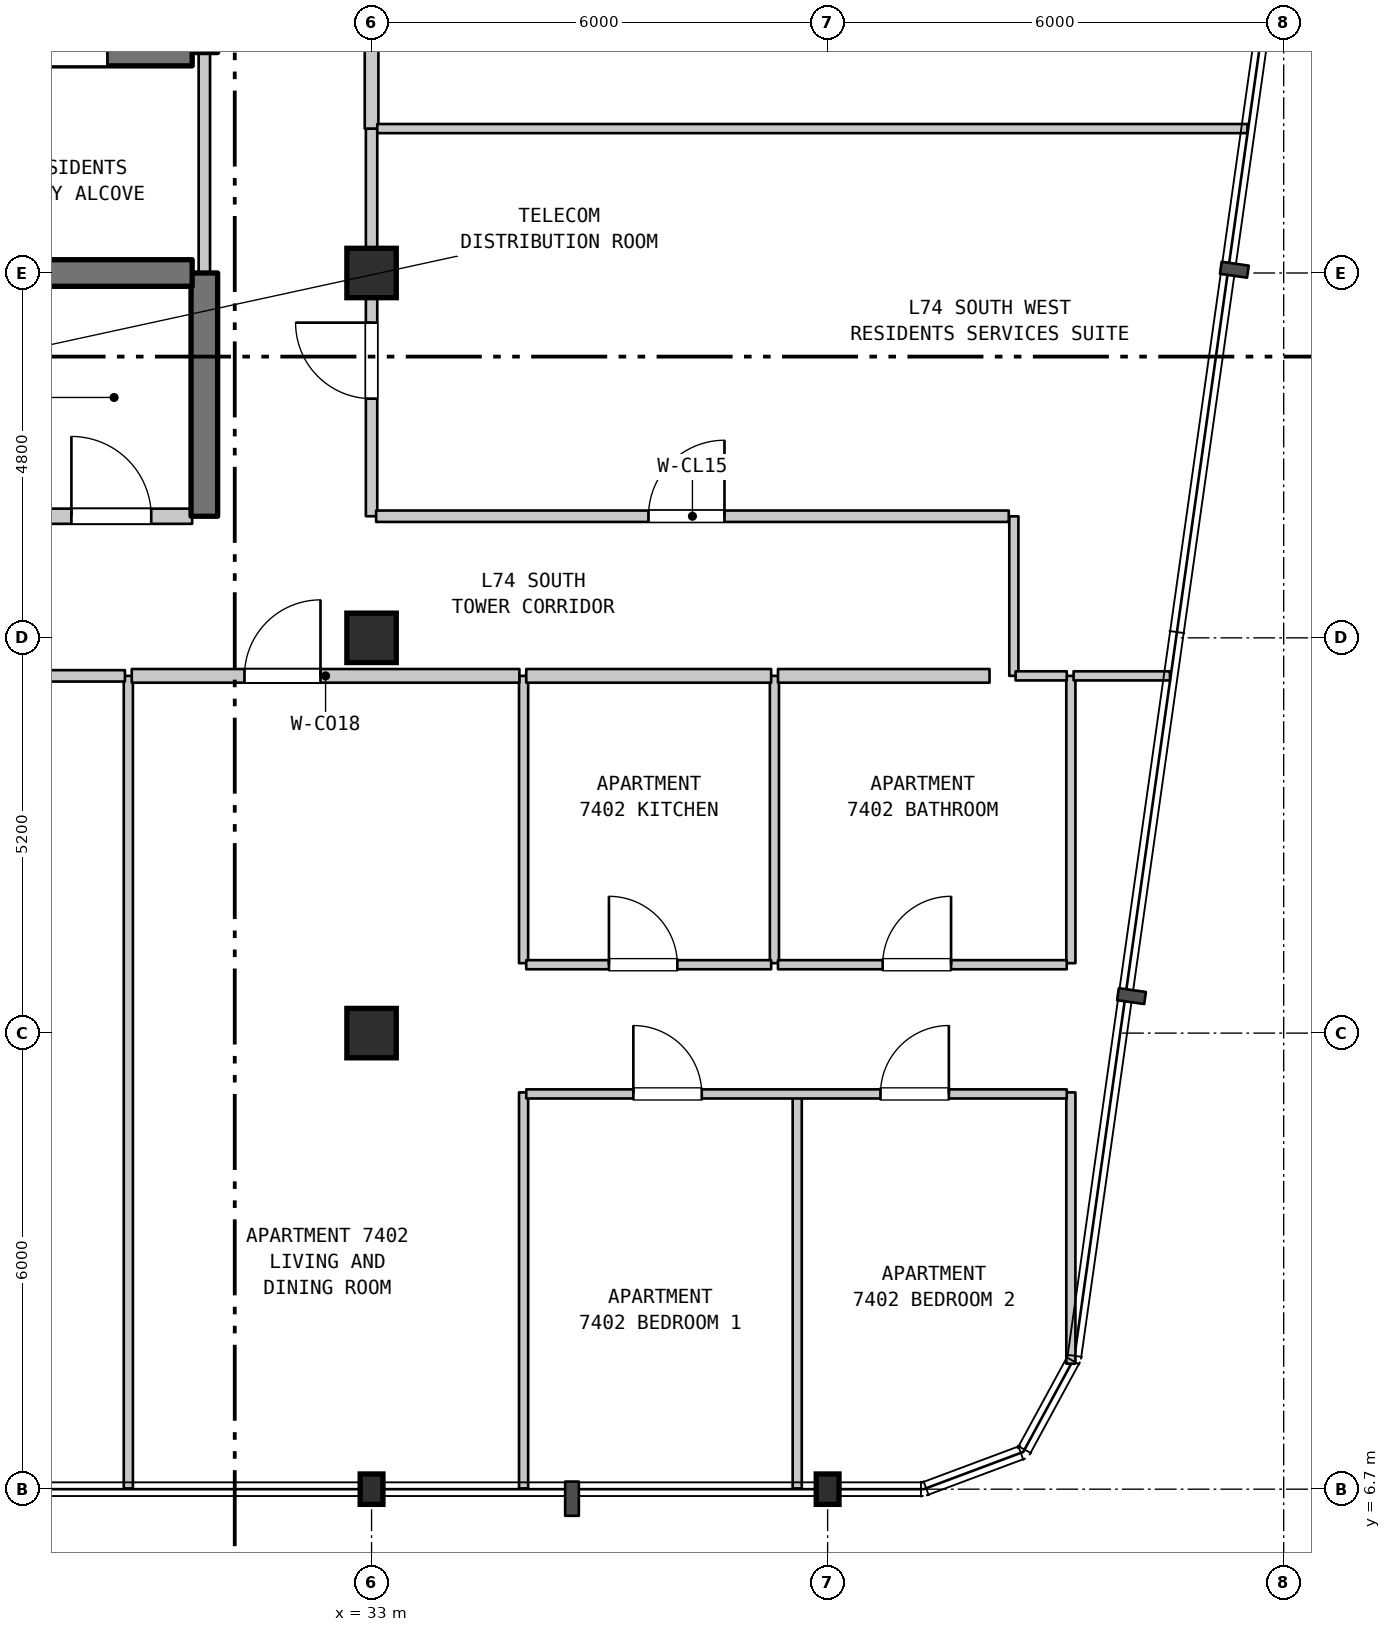
"""IFC4 building model, lengths in metres.
Left out: names, types, materials, properties, quantities, classifications, styles, units other than length and angle.
Written with IfcOpenShell. Run it as: python <this file> out.ifc"""

import sys

from ifc_helpers import new_model, si_unit, direction, frame, frame_2d, origin, origin_2d, place, context, subcontext, project, spatial, rectangle, i_section, extrude, element, fill, save


model = new_model("IFC4")
c1 = context("Model", 3, precision=1e-05, world=origin(), true_north=direction((0.0, 1.0)))
c2 = subcontext(c1, "Body", "Model", "MODEL_VIEW")
j1 = project(units=[si_unit("LENGTHUNIT", "METRE"), si_unit("PLANEANGLEUNIT", "RADIAN")], contexts=[c1])
p1 = place(None, origin())
s1 = spatial("IfcSite", under=j1, at=p1, CompositionType="ELEMENT")
p2 = place(p1, origin())
s2 = spatial("IfcBuilding", under=s1, at=p2, CompositionType="ELEMENT")
p3 = place(p2, frame((0.0, 0.0, 295.4)))
s3 = spatial("IfcBuildingStorey", under=s2, at=p3, CompositionType="ELEMENT", Elevation=295.4)
p4 = place(p3, frame((33.0, 6.7, 0.0), z_axis=(0.0, 0.0, 1.0), x_axis=(1.0, 0.0, 0.0)))
e1 = element("IfcColumn", 1, at=p4, inside=s3, PredefinedType="COLUMN", context=c2, shape_type="SweptSolid", body=[
    extrude(i_section(OverallWidth=0.3, OverallDepth=0.4, WebThickness=0.013, FlangeThickness=0.024, FilletRadius=0.027, at=origin_2d()), origin(), (0.0, 0.0, 1.0), 3.7),
])
for number, where, z_axis, x_axis in (
    (2, (33.0, 12.7, 0.0), (0.0, 0.0, 1.0), (1.0, 0.0, 0.0)),
    (3, (33.0, 17.9, 0.0), (0.0, 0.0, 1.0), (1.0, 0.0, 0.0)),
    (4, (33.0, 22.7, 0.0), (0.0, 0.0, 1.0), (1.0, 0.0, 0.0)),
):
    element("IfcColumn", number, at=place(p3, frame(where, z_axis=z_axis, x_axis=x_axis)), inside=s3, PredefinedType="COLUMN", context=c2, shape_type="SweptSolid", body=[
        extrude(rectangle(XDim=0.65, YDim=0.65, at=origin_2d()), origin(), (0.0, 0.0, 1.0), 3.7),
    ])
p5 = place(p3, frame((39.0, 6.7, 0.0), z_axis=(0.0, 0.0, 1.0), x_axis=(1.0, 0.0, 0.0)))
e5 = element("IfcColumn", 5, at=p5, inside=s3, PredefinedType="COLUMN", context=c2, shape_type="SweptSolid", body=[
    extrude(i_section(OverallWidth=0.3, OverallDepth=0.4, WebThickness=0.013, FlangeThickness=0.024, FilletRadius=0.027, at=origin_2d()), origin(), (0.0, 0.0, 1.0), 3.7),
])
p6 = place(p3, frame((29.8, 6.71, 0.0), z_axis=(0.0, 0.0, 1.0), x_axis=(0.0, 1.0, 0.0)))
e6 = element("IfcWall", 6, at=p6, inside=s3, PredefinedType="PARTITIONING", context=c2, shape_type="SweptSolid", body=[
    extrude(rectangle(XDim=10.69, YDim=0.12, at=frame_2d((5.345, 0.0))), origin(), (0.0, 0.0, 1.0), 3.38),
])
p7 = place(p3, frame((30.8, 19.5, 0.0), z_axis=(0.0, 0.0, 1.0), x_axis=(0.0, 1.0, 0.0)))
e7 = element("IfcWall", 7, at=p7, inside=s3, PredefinedType="SHEAR", context=c2, shape_type="SweptSolid", body=[
    extrude(rectangle(XDim=3.2, YDim=0.35, at=frame_2d((1.6, 0.0))), origin(), (0.0, 0.0, 1.0), 3.38),
])
p8 = place(p3, frame((30.8, 22.7, 0.0), z_axis=(0.0, 0.0, 1.0), x_axis=(0.0, 1.0, 0.0)))
e8 = element("IfcWall", 8, at=p8, inside=s3, PredefinedType="STANDARD", context=c2, shape_type="SweptSolid", body=[
    extrude(rectangle(XDim=2.9, YDim=0.15, at=frame_2d((1.45, 0.0))), origin(), (0.0, 0.0, 1.0), 3.38),
])
p9 = place(p3, frame((33.0, 19.5, 0.0), z_axis=(0.0, 0.0, 1.0), x_axis=(0.0, 1.0, 0.0)))
e9 = element("IfcWall", 9, at=p9, inside=s3, PredefinedType="STANDARD", context=c2, shape_type="SweptSolid", body=[
    extrude(rectangle(XDim=5.1, YDim=0.15, at=frame_2d((2.55, 0.0))), origin(), (0.0, 0.0, 1.0), 3.09),
])
p10 = place(p9, frame((1.547, 0.0, 0.0)))
e10 = element("IfcOpeningElement", 10, at=p10, cuts=e9, PredefinedType="OPENING", context=c2, shape_type="SweptSolid", body=[
    extrude(rectangle(XDim=1.0, YDim=2.15, at=frame_2d((0.5, 1.075))), frame((0.0, 0.085, 0.0), z_axis=(0.0, -1.0, 0.0), x_axis=(1.0, 0.0, 0.0)), (0.0, 0.0, 1.0), 0.17),
])
p11 = place(p3, frame((33.0, 24.6, 0.0), z_axis=(0.0, 0.0, 1.0), x_axis=(0.0, 1.0, 0.0)))
e11 = element("IfcWall", 11, at=p11, inside=s3, PredefinedType="STANDARD", context=c2, shape_type="SweptSolid", body=[
    extrude(rectangle(XDim=3.4, YDim=0.18, at=frame_2d((1.7, 0.0))), origin(), (0.0, 0.0, 1.0), 3.09),
])
p12 = place(p11, frame((1.127, 0.0, 0.0)))
e12 = element("IfcOpeningElement", 12, at=p12, cuts=e11, PredefinedType="OPENING", context=c2, shape_type="SweptSolid", body=[
    extrude(rectangle(XDim=1.0, YDim=2.15, at=frame_2d((0.5, 1.075))), frame((0.0, 0.1, 0.0), z_axis=(0.0, -1.0, 0.0), x_axis=(1.0, 0.0, 0.0)), (0.0, 0.0, 1.0), 0.2),
])
p13 = place(p3, frame((35.0, 6.71, 0.0), z_axis=(0.0, 0.0, 1.0), x_axis=(0.0, 1.0, 0.0)))
e13 = element("IfcWall", 13, at=p13, inside=s3, PredefinedType="PARTITIONING", context=c2, shape_type="SweptSolid", body=[
    extrude(rectangle(XDim=5.21, YDim=0.12, at=frame_2d((2.605, 0.0))), origin(), (0.0, 0.0, 1.0), 3.38),
])
for number, where, z_axis, x_axis in (
    (14, (35.0, 13.62, 0.0), (0.0, 0.0, 1.0), (0.0, 1.0, 0.0)),
    (15, (38.3, 13.62, 0.0), (0.0, 0.0, 1.0), (0.0, 1.0, 0.0)),
):
    element("IfcWall", number, at=place(p3, frame(where, z_axis=z_axis, x_axis=x_axis)), inside=s3, PredefinedType="PARTITIONING", context=c2, shape_type="SweptSolid", body=[
        extrude(rectangle(XDim=3.78, YDim=0.12, at=frame_2d((1.89, 0.0))), origin(), (0.0, 0.0, 1.0), 3.38),
    ])
p14 = place(p3, frame((38.6, 6.71, 0.0), z_axis=(0.0, 0.0, 1.0), x_axis=(0.0, 1.0, 0.0)))
e16 = element("IfcWall", 16, at=p14, inside=s3, PredefinedType="PARTITIONING", context=c2, shape_type="SweptSolid", body=[
    extrude(rectangle(XDim=5.21, YDim=0.12, at=frame_2d((2.605, 0.0))), origin(), (0.0, 0.0, 1.0), 3.38),
])
p15 = place(p3, frame((41.45, 17.4, 0.0), z_axis=(0.0, 0.0, 1.0), x_axis=(0.0, 1.0, 0.0)))
e17 = element("IfcWall", 17, at=p15, inside=s3, PredefinedType="PARTITIONING", context=c2, shape_type="SweptSolid", body=[
    extrude(rectangle(XDim=2.099, YDim=0.12, at=frame_2d((1.05, 0.0))), origin(), (0.0, 0.0, 1.0), 3.38),
])
p16 = place(p3, frame((42.2, 8.351, 0.0), z_axis=(0.0, 0.0, 1.0), x_axis=(0.0, 1.0, 0.0)))
e18 = element("IfcWall", 18, at=p16, inside=s3, PredefinedType="PARTITIONING", context=c2, shape_type="SweptSolid", body=[
    extrude(rectangle(XDim=3.569, YDim=0.12, at=frame_2d((1.784, 0.0))), origin(), (0.0, 0.0, 1.0), 3.38),
])
p17 = place(p3, frame((42.2, 13.62, 0.0), z_axis=(0.0, 0.0, 1.0), x_axis=(0.0, 1.0, 0.0)))
e19 = element("IfcWall", 19, at=p17, inside=s3, PredefinedType="PARTITIONING", context=c2, shape_type="SweptSolid", body=[
    extrude(rectangle(XDim=3.78, YDim=0.12, at=frame_2d((1.89, 0.0))), origin(), (0.0, 0.0, 1.0), 3.38),
])
p18 = place(p3, frame((35.035, 11.9, 0.0), z_axis=(0.0, 0.0, 1.0), x_axis=(1.0, 0.0, 0.0)))
e20 = element("IfcWall", 20, at=p18, inside=s3, PredefinedType="PARTITIONING", context=c2, shape_type="SweptSolid", body=[
    extrude(rectangle(XDim=7.111, YDim=0.12, at=frame_2d((3.556, 0.0))), origin(), (0.0, 0.0, 1.0), 3.38),
])
p19 = place(p18, frame((1.409, 0.0, 0.0)))
e21 = element("IfcOpeningElement", 21, at=p19, cuts=e20, PredefinedType="OPENING", context=c2, shape_type="SweptSolid", body=[
    extrude(rectangle(XDim=0.9, YDim=2.15, at=frame_2d((0.45, 1.075))), frame((0.0, 0.07, 0.0), z_axis=(0.0, -1.0, 0.0), x_axis=(1.0, 0.0, 0.0)), (0.0, 0.0, 1.0), 0.14),
])
p20 = place(p18, frame((4.66, 0.0, 0.0)))
e22 = element("IfcOpeningElement", 22, at=p20, cuts=e20, PredefinedType="OPENING", context=c2, shape_type="SweptSolid", body=[
    extrude(rectangle(XDim=0.9, YDim=2.15, at=frame_2d((0.45, 1.075))), frame((0.0, 0.07, 0.0), z_axis=(0.0, -1.0, 0.0), x_axis=(1.0, 0.0, 0.0)), (0.0, 0.0, 1.0), 0.14),
])
p21 = place(p3, frame((35.035, 13.6, 0.0), z_axis=(0.0, 0.0, 1.0), x_axis=(1.0, 0.0, 0.0)))
e23 = element("IfcWall", 23, at=p21, inside=s3, PredefinedType="PARTITIONING", context=c2, shape_type="SweptSolid", body=[
    extrude(rectangle(XDim=3.222, YDim=0.12, at=frame_2d((1.611, 0.0))), origin(), (0.0, 0.0, 1.0), 3.38),
])
p22 = place(p21, frame((1.088, 0.0, 0.0)))
e24 = element("IfcOpeningElement", 24, at=p22, cuts=e23, PredefinedType="OPENING", context=c2, shape_type="SweptSolid", body=[
    extrude(rectangle(XDim=0.9, YDim=2.15, at=frame_2d((0.45, 1.075))), frame((0.0, 0.07, 0.0), z_axis=(0.0, -1.0, 0.0), x_axis=(1.0, 0.0, 0.0)), (0.0, 0.0, 1.0), 0.14),
])
p23 = place(p3, frame((38.347, 13.6, 0.0), z_axis=(0.0, 0.0, 1.0), x_axis=(1.0, 0.0, 0.0)))
e25 = element("IfcWall", 25, at=p23, inside=s3, PredefinedType="PARTITIONING", context=c2, shape_type="SweptSolid", body=[
    extrude(rectangle(XDim=3.799, YDim=0.12, at=frame_2d((1.899, 0.0))), origin(), (0.0, 0.0, 1.0), 3.38),
])
p24 = place(p23, frame((1.377, 0.0, 0.0)))
e26 = element("IfcOpeningElement", 26, at=p24, cuts=e25, PredefinedType="OPENING", context=c2, shape_type="SweptSolid", body=[
    extrude(rectangle(XDim=0.9, YDim=2.1, at=frame_2d((0.45, 1.05))), frame((0.0, 0.07, 0.0), z_axis=(0.0, -1.0, 0.0), x_axis=(1.0, 0.0, 0.0)), (0.0, 0.0, 1.0), 0.14),
])
p25 = place(p3, frame((25.545, 17.4, 0.0), z_axis=(0.0, 0.0, 1.0), x_axis=(1.0, 0.0, 0.0)))
e27 = element("IfcWall", 27, at=p25, inside=s3, PredefinedType="STANDARD", context=c2, shape_type="SweptSolid", body=[
    extrude(rectangle(XDim=4.21, YDim=0.15, at=frame_2d((2.105, 0.0))), origin(), (0.0, 0.0, 1.0), 3.38),
])
p26 = place(p25, frame((1.605, 0.0, 0.0)))
e28 = element("IfcOpeningElement", 28, at=p26, cuts=e27, PredefinedType="OPENING", context=c2, shape_type="SweptSolid", body=[
    extrude(rectangle(XDim=1.0, YDim=2.15, at=frame_2d((0.5, 1.075))), frame((0.0, 0.085, 0.0), z_axis=(0.0, -1.0, 0.0), x_axis=(1.0, 0.0, 0.0)), (0.0, 0.0, 1.0), 0.17),
])
p27 = place(p3, frame((29.845, 17.4, 0.0), z_axis=(0.0, 0.0, 1.0), x_axis=(1.0, 0.0, 0.0)))
e29 = element("IfcWall", 29, at=p27, inside=s3, PredefinedType="STANDARD", context=c2, shape_type="SweptSolid", body=[
    extrude(rectangle(XDim=5.1, YDim=0.18, at=frame_2d((2.55, 0.0))), origin(), (0.0, 0.0, 1.0), 3.38),
])
p28 = place(p27, frame((1.483, 0.0, 0.0)))
e30 = element("IfcOpeningElement", 30, at=p28, cuts=e29, PredefinedType="OPENING", context=c2, shape_type="SweptSolid", body=[
    extrude(rectangle(XDim=1.0, YDim=2.15, at=frame_2d((0.5, 1.075))), frame((0.0, 0.1, 0.0), z_axis=(0.0, -1.0, 0.0), x_axis=(1.0, 0.0, 0.0)), (0.0, 0.0, 1.0), 0.2),
])
p29 = place(p3, frame((35.035, 17.4, 0.0), z_axis=(0.0, 0.0, 1.0), x_axis=(1.0, 0.0, 0.0)))
e31 = element("IfcWall", 31, at=p29, inside=s3, PredefinedType="STANDARD", context=c2, shape_type="SweptSolid", body=[
    extrude(rectangle(XDim=3.222, YDim=0.18, at=frame_2d((1.611, 0.0))), origin(), (0.0, 0.0, 1.0), 3.38),
])
p30 = place(p3, frame((38.347, 17.4, 0.0), z_axis=(0.0, 0.0, 1.0), x_axis=(1.0, 0.0, 0.0)))
e32 = element("IfcWall", 32, at=p30, inside=s3, PredefinedType="STANDARD", context=c2, shape_type="SweptSolid", body=[
    extrude(rectangle(XDim=2.783, YDim=0.18, at=frame_2d((1.392, 0.0))), origin(), (0.0, 0.0, 1.0), 3.38),
])
p31 = place(p3, frame((41.473, 17.4, 0.0), z_axis=(0.0, 0.0, 1.0), x_axis=(1.0, 0.0, 0.0)))
e33 = element("IfcWall", 33, at=p31, inside=s3, PredefinedType="PARTITIONING", context=c2, shape_type="SweptSolid", body=[
    extrude(rectangle(XDim=0.673, YDim=0.12, at=frame_2d((0.336, 0.0))), origin(), (0.0, 0.0, 1.0), 3.38),
])
p32 = place(p3, frame((42.236, 17.4, 0.0), z_axis=(0.0, 0.0, 1.0), x_axis=(1.0, 0.0, 0.0)))
e34 = element("IfcWall", 34, at=p32, inside=s3, PredefinedType="PARTITIONING", context=c2, shape_type="SweptSolid", body=[
    extrude(rectangle(XDim=1.268, YDim=0.12, at=frame_2d((0.634, 0.0))), origin(), (0.0, 0.0, 1.0), 3.38),
])
p33 = place(p3, frame((28.585, 19.5, 0.0), z_axis=(0.0, 0.0, 1.0), x_axis=(1.0, 0.0, 0.0)))
e35 = element("IfcWall", 35, at=p33, inside=s3, PredefinedType="STANDARD", context=c2, shape_type="SweptSolid", body=[
    extrude(rectangle(XDim=2.055, YDim=0.2, at=frame_2d((1.027, 0.0))), origin(), (0.0, 0.0, 1.0), 3.38),
])
p34 = place(p33, frame((0.466, 0.0, 0.0)))
e36 = element("IfcOpeningElement", 36, at=p34, cuts=e35, PredefinedType="OPENING", context=c2, shape_type="SweptSolid", body=[
    extrude(rectangle(XDim=1.05, YDim=2.15, at=frame_2d((0.525, 1.075))), frame((0.0, 0.11, 0.0), z_axis=(0.0, -1.0, 0.0), x_axis=(1.0, 0.0, 0.0)), (0.0, 0.0, 1.0), 0.22),
])
p35 = place(p3, frame((33.06, 19.5, 0.0), z_axis=(0.0, 0.0, 1.0), x_axis=(1.0, 0.0, 0.0)))
e37 = element("IfcWall", 37, at=p35, inside=s3, PredefinedType="STANDARD", context=c2, shape_type="SweptSolid", body=[
    extrude(rectangle(XDim=8.323, YDim=0.15, at=frame_2d((4.162, 0.0))), origin(), (0.0, 0.0, 1.0), 3.38),
])
p36 = place(p35, frame((3.583, 0.0, 0.0)))
e38 = element("IfcOpeningElement", 38, at=p36, cuts=e37, PredefinedType="OPENING", context=c2, shape_type="SweptSolid", body=[
    extrude(rectangle(XDim=1.0, YDim=2.15, at=frame_2d((0.5, 1.075))), frame((0.0, 0.085, 0.0), z_axis=(0.0, -1.0, 0.0), x_axis=(1.0, 0.0, 0.0)), (0.0, 0.0, 1.0), 0.17),
])
p37 = place(p3, frame((28.585, 22.7, 0.0), z_axis=(0.0, 0.0, 1.0), x_axis=(1.0, 0.0, 0.0)))
e39 = element("IfcWall", 39, at=p37, inside=s3, PredefinedType="SHEAR", context=c2, shape_type="SweptSolid", body=[
    extrude(rectangle(XDim=2.055, YDim=0.35, at=frame_2d((1.027, 0.0))), origin(), (0.0, 0.0, 1.0), 3.38),
])
p38 = place(p3, frame((33.075, 24.6, 0.0), z_axis=(0.0, 0.0, 1.0), x_axis=(1.0, 0.0, 0.0)))
e40 = element("IfcWall", 40, at=p38, inside=s3, PredefinedType="PARTITIONING", context=c2, shape_type="SweptSolid", body=[
    extrude(rectangle(XDim=11.448, YDim=0.12, at=frame_2d((5.724, 0.0))), origin(), (0.0, 0.0, 1.0), 3.38),
])
p39 = place(p3, frame((27.46, 25.6, 0.0), z_axis=(0.0, 0.0, 1.0), x_axis=(1.0, 0.0, 0.0)))
e41 = element("IfcWall", 41, at=p39, inside=s3, PredefinedType="SHEAR", context=c2, shape_type="SweptSolid", body=[
    extrude(rectangle(XDim=3.18, YDim=0.35, at=frame_2d((1.59, 0.0))), origin(), (0.0, 0.0, 1.0), 3.38),
])
p40 = place(p39, frame((1.115, 0.0, 0.0)))
e42 = element("IfcOpeningElement", 42, at=p40, cuts=e41, PredefinedType="OPENING", context=c2, shape_type="SweptSolid", body=[
    extrude(rectangle(XDim=0.95, YDim=2.15, at=frame_2d((0.475, 1.075))), frame((0.0, 0.185, 0.0), z_axis=(0.0, -1.0, 0.0), x_axis=(1.0, 0.0, 0.0)), (0.0, 0.0, 1.0), 0.37),
])
p41 = place(p10, origin())
e43 = element("IfcDoor", 43, at=p41, inside=s3, OperationType="SINGLE_SWING_RIGHT", PredefinedType="DOOR", context=c2, shape_type="SweptSolid", body=[
    extrude(rectangle(XDim=1.0, YDim=2.15, at=frame_2d((0.5, 1.075))), frame((0.0, 0.025, 0.0), z_axis=(0.0, -1.0, 0.0), x_axis=(1.0, 0.0, 0.0)), (0.0, 0.0, 1.0), 0.05),
])
fill(e10, e43)
p42 = place(p19, origin())
e44 = element("IfcDoor", 44, at=p42, inside=s3, OperationType="SINGLE_SWING_LEFT", PredefinedType="DOOR", context=c2, shape_type="SweptSolid", body=[
    extrude(rectangle(XDim=0.9, YDim=2.15, at=frame_2d((0.45, 1.075))), frame((0.0, 0.025, 0.0), z_axis=(0.0, -1.0, 0.0), x_axis=(1.0, 0.0, 0.0)), (0.0, 0.0, 1.0), 0.05),
])
fill(e21, e44)
p43 = place(p20, origin())
e45 = element("IfcDoor", 45, at=p43, inside=s3, OperationType="SINGLE_SWING_RIGHT", PredefinedType="DOOR", context=c2, shape_type="SweptSolid", body=[
    extrude(rectangle(XDim=0.9, YDim=2.15, at=frame_2d((0.45, 1.075))), frame((0.0, 0.025, 0.0), z_axis=(0.0, -1.0, 0.0), x_axis=(1.0, 0.0, 0.0)), (0.0, 0.0, 1.0), 0.05),
])
fill(e22, e45)
p44 = place(p22, origin())
e46 = element("IfcDoor", 46, at=p44, inside=s3, OperationType="SINGLE_SWING_LEFT", PredefinedType="DOOR", context=c2, shape_type="SweptSolid", body=[
    extrude(rectangle(XDim=0.9, YDim=2.15, at=frame_2d((0.45, 1.075))), frame((0.0, 0.025, 0.0), z_axis=(0.0, -1.0, 0.0), x_axis=(1.0, 0.0, 0.0)), (0.0, 0.0, 1.0), 0.05),
])
fill(e24, e46)
p45 = place(p24, origin())
e47 = element("IfcDoor", 47, at=p45, inside=s3, OperationType="SINGLE_SWING_RIGHT", PredefinedType="DOOR", context=c2, shape_type="SweptSolid", body=[
    extrude(rectangle(XDim=0.9, YDim=2.1, at=frame_2d((0.45, 1.05))), frame((0.0, 0.025, 0.0), z_axis=(0.0, -1.0, 0.0), x_axis=(1.0, 0.0, 0.0)), (0.0, 0.0, 1.0), 0.05),
])
fill(e26, e47)
p46 = place(p28, origin())
e48 = element("IfcDoor", 48, at=p46, inside=s3, OperationType="SINGLE_SWING_RIGHT", PredefinedType="DOOR", context=c2, shape_type="SweptSolid", body=[
    extrude(rectangle(XDim=1.0, YDim=2.15, at=frame_2d((0.5, 1.075))), frame((0.0, 0.025, 0.0), z_axis=(0.0, -1.0, 0.0), x_axis=(1.0, 0.0, 0.0)), (0.0, 0.0, 1.0), 0.05),
])
fill(e30, e48)
p47 = place(p34, origin())
e49 = element("IfcDoor", 49, at=p47, inside=s3, OperationType="SINGLE_SWING_LEFT", PredefinedType="DOOR", context=c2, shape_type="SweptSolid", body=[
    extrude(rectangle(XDim=1.05, YDim=2.15, at=frame_2d((0.525, 1.075))), frame((0.0, 0.025, 0.0), z_axis=(0.0, -1.0, 0.0), x_axis=(1.0, 0.0, 0.0)), (0.0, 0.0, 1.0), 0.05),
])
fill(e36, e49)
p48 = place(p36, origin())
e50 = element("IfcDoor", 50, at=p48, inside=s3, OperationType="SINGLE_SWING_RIGHT", PredefinedType="DOOR", context=c2, shape_type="SweptSolid", body=[
    extrude(rectangle(XDim=1.0, YDim=2.15, at=frame_2d((0.5, 1.075))), frame((0.0, 0.025, 0.0), z_axis=(0.0, -1.0, 0.0), x_axis=(1.0, 0.0, 0.0)), (0.0, 0.0, 1.0), 0.05),
])
fill(e38, e50)
p49 = place(p40, origin())
e51 = element("IfcDoor", 51, at=p49, inside=s3, OperationType="SINGLE_SWING_LEFT", PredefinedType="DOOR", context=c2, shape_type="SweptSolid", body=[
    extrude(rectangle(XDim=0.95, YDim=2.15, at=frame_2d((0.475, 1.075))), frame((0.0, 0.025, 0.0), z_axis=(0.0, -1.0, 0.0), x_axis=(1.0, 0.0, 0.0)), (0.0, 0.0, 1.0), 0.05),
])
fill(e42, e51)
save(model, sys.argv[1])
